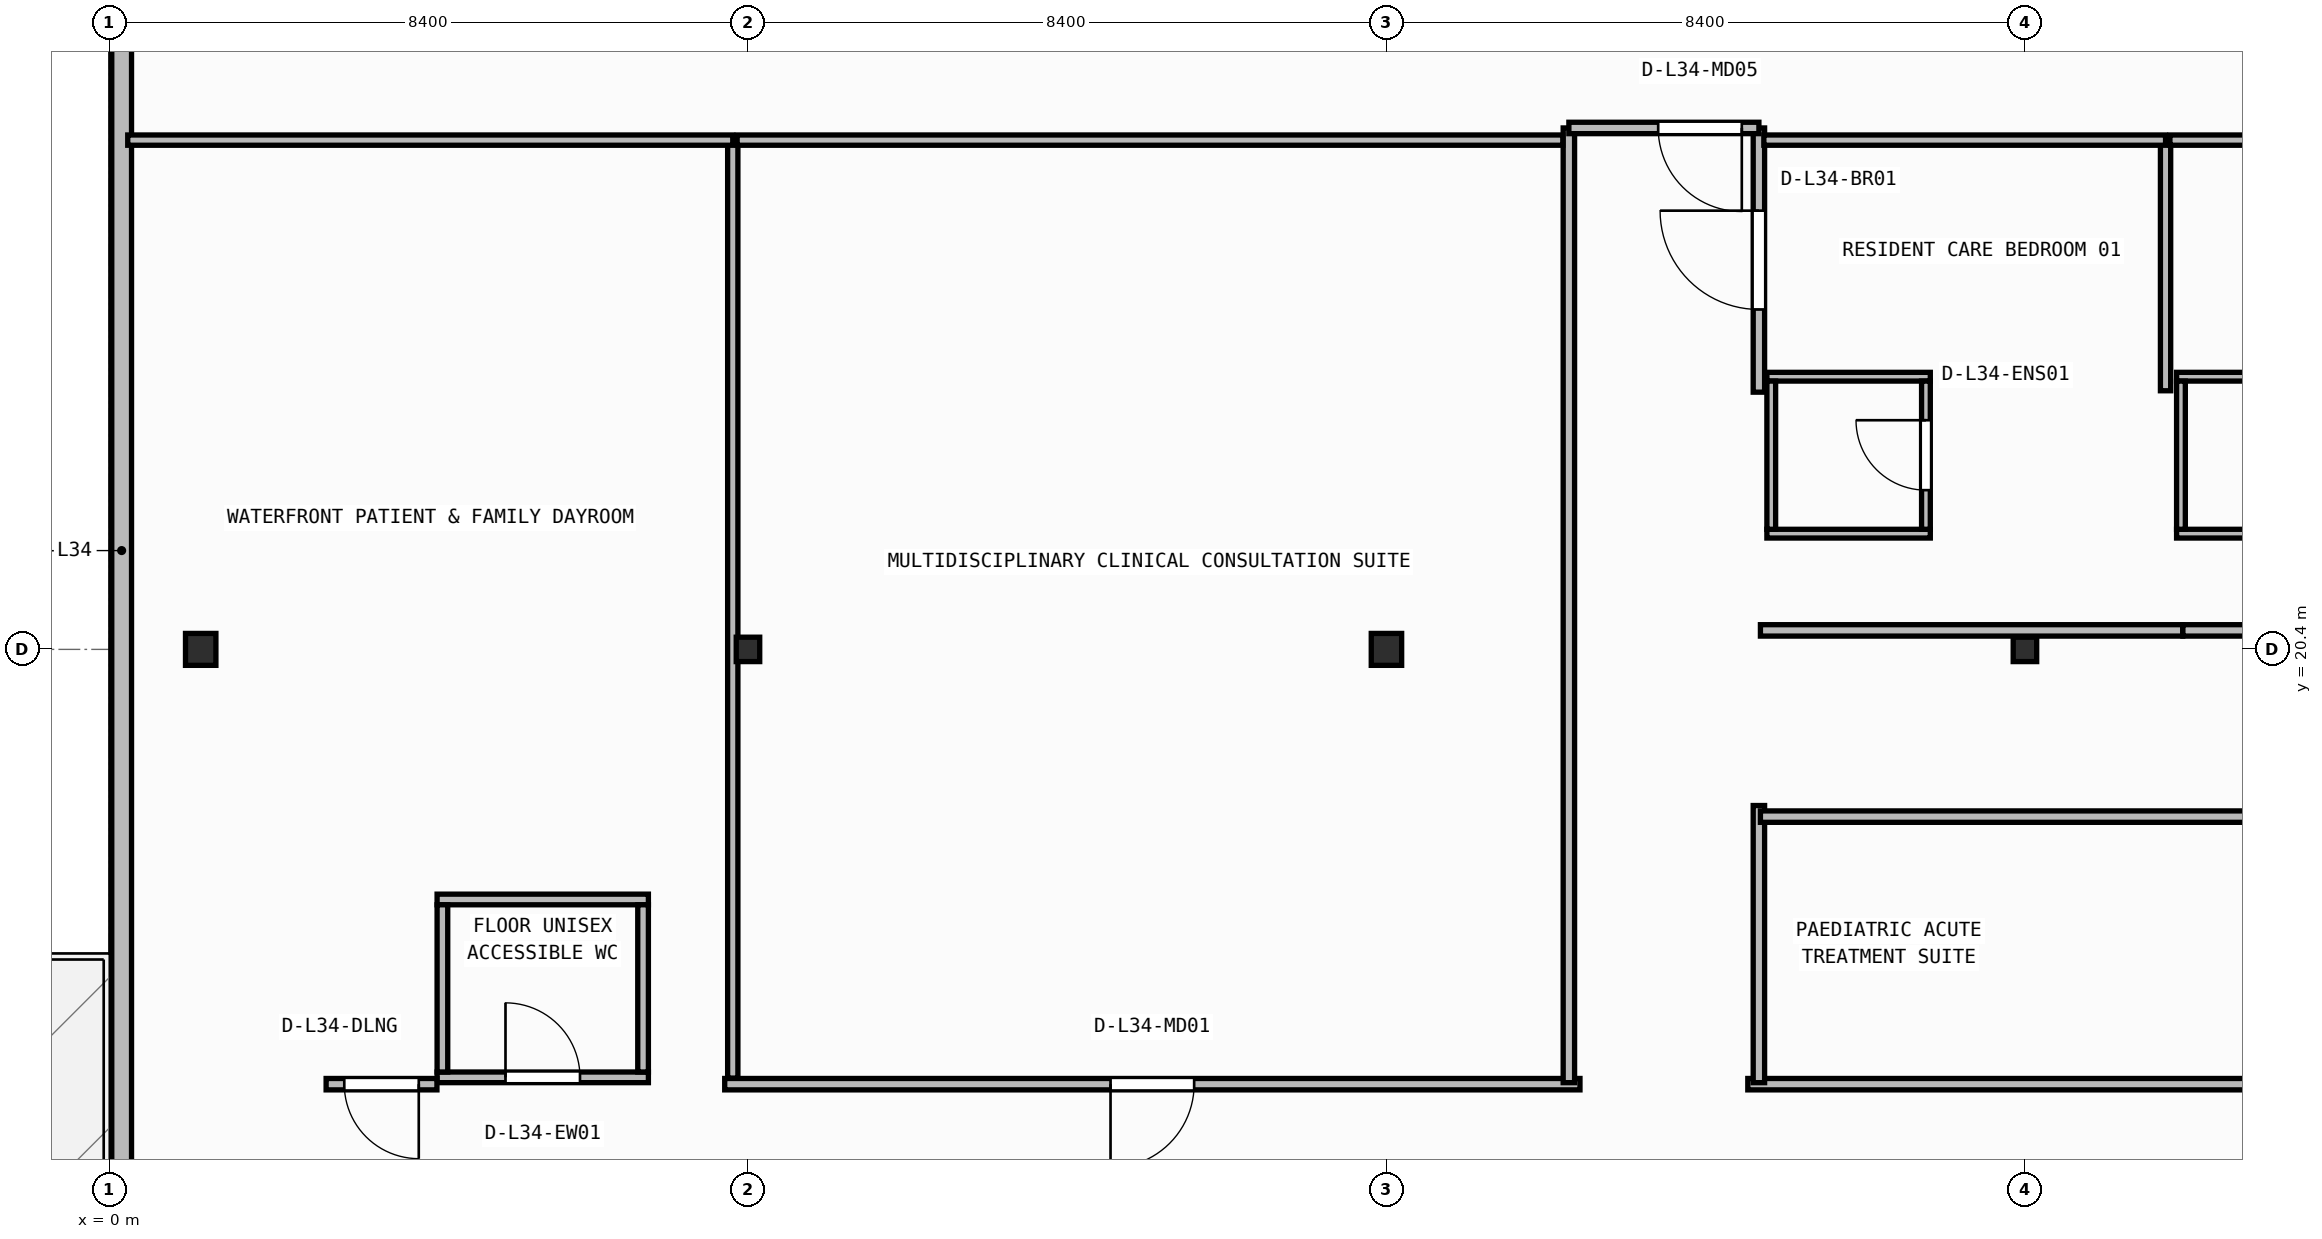
"""IFC4 building model, lengths in metres.
Left out: names, types, materials, properties, quantities, classifications, styles, units other than length and angle.
Written with IfcOpenShell. Run it as: python <this file> out.ifc"""

import sys

from ifc_helpers import new_model, si_unit, direction, frame, frame_2d, origin, origin_2d, place, context, subcontext, project, spatial, rectangle, i_section, extrude, element, fill, save


model = new_model("IFC4")
c1 = context("Model", 3, precision=1e-05, world=origin(), true_north=direction((0.0, 1.0)))
c2 = subcontext(c1, "Body", "Model", "MODEL_VIEW")
j1 = project(units=[si_unit("LENGTHUNIT", "METRE"), si_unit("PLANEANGLEUNIT", "RADIAN")], contexts=[c1])
p1 = place(None, origin())
s1 = spatial("IfcSite", under=j1, at=p1, CompositionType="ELEMENT")
p2 = place(p1, origin())
s2 = spatial("IfcBuilding", under=s1, at=p2, CompositionType="ELEMENT")
p3 = place(p2, frame((0.0, 0.0, 138.9)))
s3 = spatial("IfcBuildingStorey", under=s2, at=p3, CompositionType="ELEMENT", Elevation=138.9)
p4 = place(p3, frame((1.2, 20.4, 0.0), z_axis=(0.0, 0.0, 1.0), x_axis=(1.0, 0.0, 0.0)))
e1 = element("IfcColumn", 1, at=p4, inside=s3, PredefinedType="COLUMN", context=c2, shape_type="SweptSolid", body=[
    extrude(i_section(OverallWidth=0.4, OverallDepth=0.42, WebThickness=0.025, FlangeThickness=0.04, at=origin_2d()), origin(), (0.0, 0.0, 1.0), 3.95),
])
p5 = place(p3, frame((8.4, 20.4, 0.0), z_axis=(0.0, 0.0, 1.0), x_axis=(1.0, 0.0, 0.0)))
e2 = element("IfcColumn", 2, at=p5, inside=s3, PredefinedType="COLUMN", context=c2, shape_type="SweptSolid", body=[
    extrude(i_section(OverallWidth=0.309, OverallDepth=0.321, WebThickness=0.014, FlangeThickness=0.022, FilletRadius=0.017, at=origin_2d()), origin(), (0.0, 0.0, 1.0), 3.95),
])
p6 = place(p3, frame((16.8, 20.4, 0.0), z_axis=(0.0, 0.0, 1.0), x_axis=(1.0, 0.0, 0.0)))
e3 = element("IfcColumn", 3, at=p6, inside=s3, PredefinedType="COLUMN", context=c2, shape_type="SweptSolid", body=[
    extrude(i_section(OverallWidth=0.4, OverallDepth=0.42, WebThickness=0.025, FlangeThickness=0.04, at=origin_2d()), origin(), (0.0, 0.0, 1.0), 3.95),
])
p7 = place(p3, frame((25.2, 20.4, 0.0), z_axis=(0.0, 0.0, 1.0), x_axis=(1.0, 0.0, 0.0)))
e4 = element("IfcColumn", 4, at=p7, inside=s3, PredefinedType="COLUMN", context=c2, shape_type="SweptSolid", body=[
    extrude(i_section(OverallWidth=0.309, OverallDepth=0.321, WebThickness=0.014, FlangeThickness=0.022, FilletRadius=0.017, at=origin_2d()), origin(), (0.0, 0.0, 1.0), 3.95),
])
p8 = place(p3, frame((0.16, 40.64, 0.0), z_axis=(0.0, 0.0, 1.0), x_axis=(0.0, -1.0, 0.0)))
e5 = element("IfcWall", 5, at=p8, inside=s3, PredefinedType="STANDARD", context=c2, shape_type="SweptSolid", body=[
    extrude(rectangle(XDim=37.88, YDim=0.26, at=frame_2d((18.94, 0.0))), origin(), (0.0, 0.0, 1.0), 3.71),
])
p9 = place(p8, frame((29.865, 0.0, 0.0)))
e6 = element("IfcOpeningElement", 6, at=p9, cuts=e5, PredefinedType="OPENING", context=c2, shape_type="SweptSolid", body=[
    extrude(rectangle(XDim=1.3, YDim=2.15, at=frame_2d((0.65, 1.075))), frame((0.0, 0.14, 0.0), z_axis=(0.0, -1.0, 0.0), x_axis=(1.0, 0.0, 0.0)), (0.0, 0.0, 1.0), 0.28),
])
p10 = place(p3, frame((4.31, 14.77, 0.0), z_axis=(0.0, 0.0, 1.0), x_axis=(1.0, 0.0, 0.0)))
e7 = element("IfcWall", 7, at=p10, inside=s3, PredefinedType="PARTITIONING", context=c2, shape_type="SweptSolid", body=[
    extrude(rectangle(XDim=2.78, YDim=0.14, at=frame_2d((1.39, 0.0))), origin(), (0.0, 0.0, 1.0), 3.71),
])
p11 = place(p10, frame((0.9, 0.0, 0.0)))
e8 = element("IfcOpeningElement", 8, at=p11, cuts=e7, PredefinedType="OPENING", context=c2, shape_type="SweptSolid", body=[
    extrude(rectangle(XDim=0.98, YDim=2.1, at=frame_2d((0.49, 1.05))), frame((0.0, 0.08, 0.0), z_axis=(0.0, -1.0, 0.0), x_axis=(1.0, 0.0, 0.0)), (0.0, 0.0, 1.0), 0.16),
])
p12 = place(p3, frame((4.31, 17.11, 0.0), z_axis=(0.0, 0.0, 1.0), x_axis=(1.0, 0.0, 0.0)))
e9 = element("IfcWall", 9, at=p12, inside=s3, PredefinedType="PARTITIONING", context=c2, shape_type="SweptSolid", body=[
    extrude(rectangle(XDim=2.78, YDim=0.14, at=frame_2d((1.39, 0.0))), origin(), (0.0, 0.0, 1.0), 3.71),
])
for number, where, z_axis, x_axis in (
    (10, (4.38, 14.84, 0.0), (0.0, 0.0, 1.0), (0.0, 1.0, 0.0)),
    (11, (7.02, 14.84, 0.0), (0.0, 0.0, 1.0), (0.0, 1.0, 0.0)),
):
    element("IfcWall", number, at=place(p3, frame(where, z_axis=z_axis, x_axis=x_axis)), inside=s3, PredefinedType="PARTITIONING", context=c2, shape_type="SweptSolid", body=[
        extrude(rectangle(XDim=2.2, YDim=0.14, at=frame_2d((1.1, 0.0))), origin(), (0.0, 0.0, 1.0), 3.71),
    ])
for number, where, z_axis, x_axis in (
    (12, (21.805, 21.923, 0.0), (0.0, 0.0, 1.0), (1.0, 0.0, 0.0)),
    (13, (21.805, 23.988, 0.0), (0.0, 0.0, 1.0), (1.0, 0.0, 0.0)),
):
    element("IfcWall", number, at=place(p3, frame(where, z_axis=z_axis, x_axis=x_axis)), inside=s3, PredefinedType="PARTITIONING", context=c2, shape_type="SweptSolid", body=[
        extrude(rectangle(XDim=2.15, YDim=0.115, at=frame_2d((1.075, 0.0))), origin(), (0.0, 0.0, 1.0), 3.71),
    ])
p13 = place(p3, frame((21.863, 21.98, 0.0), z_axis=(0.0, 0.0, 1.0), x_axis=(0.0, 1.0, 0.0)))
e14 = element("IfcWall", 14, at=p13, inside=s3, PredefinedType="PARTITIONING", context=c2, shape_type="SweptSolid", body=[
    extrude(rectangle(XDim=1.95, YDim=0.115, at=frame_2d((0.975, 0.0))), origin(), (0.0, 0.0, 1.0), 3.71),
])
p14 = place(p3, frame((23.897, 21.98, 0.0), z_axis=(0.0, 0.0, 1.0), x_axis=(0.0, 1.0, 0.0)))
e15 = element("IfcWall", 15, at=p14, inside=s3, PredefinedType="PARTITIONING", context=c2, shape_type="SweptSolid", body=[
    extrude(rectangle(XDim=1.95, YDim=0.115, at=frame_2d((0.975, 0.0))), origin(), (0.0, 0.0, 1.0), 3.71),
])
p15 = place(p14, frame((0.515, 0.0, 0.0)))
e16 = element("IfcOpeningElement", 16, at=p15, cuts=e15, PredefinedType="OPENING", context=c2, shape_type="SweptSolid", body=[
    extrude(rectangle(XDim=0.92, YDim=2.1, at=frame_2d((0.46, 1.05))), frame((0.0, 0.067, 0.0), z_axis=(0.0, -1.0, 0.0), x_axis=(1.0, 0.0, 0.0)), (0.0, 0.0, 1.0), 0.135),
])
for number, where, z_axis, x_axis in (
    (17, (27.195, 21.923, 0.0), (0.0, 0.0, 1.0), (1.0, 0.0, 0.0)),
    (18, (27.195, 23.988, 0.0), (0.0, 0.0, 1.0), (1.0, 0.0, 0.0)),
):
    element("IfcWall", number, at=place(p3, frame(where, z_axis=z_axis, x_axis=x_axis)), inside=s3, PredefinedType="PARTITIONING", context=c2, shape_type="SweptSolid", body=[
        extrude(rectangle(XDim=2.15, YDim=0.115, at=frame_2d((1.075, 0.0))), origin(), (0.0, 0.0, 1.0), 3.71),
    ])
p16 = place(p3, frame((27.252, 21.98, 0.0), z_axis=(0.0, 0.0, 1.0), x_axis=(0.0, 1.0, 0.0)))
e19 = element("IfcWall", 19, at=p16, inside=s3, PredefinedType="PARTITIONING", context=c2, shape_type="SweptSolid", body=[
    extrude(rectangle(XDim=1.95, YDim=0.115, at=frame_2d((0.975, 0.0))), origin(), (0.0, 0.0, 1.0), 3.71),
])
p17 = place(p3, frame((4.308, 14.68, 0.0), z_axis=(0.0, 0.0, 1.0), x_axis=(-1.0, 0.0, 0.0)))
e20 = element("IfcWall", 20, at=p17, inside=s3, PredefinedType="PARTITIONING", context=c2, shape_type="SweptSolid", body=[
    extrude(rectangle(XDim=1.458, YDim=0.15, at=frame_2d((0.729, 0.0))), origin(), (0.0, 0.0, 1.0), 3.71),
])
p18 = place(p17, frame((0.239, 0.0, 0.0)))
e21 = element("IfcOpeningElement", 21, at=p18, cuts=e20, PredefinedType="OPENING", context=c2, shape_type="SweptSolid", body=[
    extrude(rectangle(XDim=0.98, YDim=2.1, at=frame_2d((0.49, 1.05))), frame((0.0, 0.085, 0.0), z_axis=(0.0, -1.0, 0.0), x_axis=(1.0, 0.0, 0.0)), (0.0, 0.0, 1.0), 0.17),
])
p19 = place(p3, frame((19.346, 14.68, 0.0), z_axis=(0.0, 0.0, 1.0), x_axis=(-1.0, 0.0, 0.0)))
e22 = element("IfcWall", 22, at=p19, inside=s3, PredefinedType="PARTITIONING", context=c2, shape_type="SweptSolid", body=[
    extrude(rectangle(XDim=11.252, YDim=0.15, at=frame_2d((5.626, 0.0))), origin(), (0.0, 0.0, 1.0), 3.71),
])
p20 = place(p19, frame((5.076, 0.0, 0.0)))
e23 = element("IfcOpeningElement", 23, at=p20, cuts=e22, PredefinedType="OPENING", context=c2, shape_type="SweptSolid", body=[
    extrude(rectangle(XDim=1.1, YDim=2.1, at=frame_2d((0.55, 1.05))), frame((0.0, 0.085, 0.0), z_axis=(0.0, -1.0, 0.0), x_axis=(1.0, 0.0, 0.0)), (0.0, 0.0, 1.0), 0.17),
])
p21 = place(p3, frame((56.64, 14.68, 0.0), z_axis=(0.0, 0.0, 1.0), x_axis=(-1.0, 0.0, 0.0)))
e24 = element("IfcWall", 24, at=p21, inside=s3, PredefinedType="PARTITIONING", context=c2, shape_type="SweptSolid", body=[
    extrude(rectangle(XDim=35.086, YDim=0.15, at=frame_2d((17.543, 0.0))), origin(), (0.0, 0.0, 1.0), 3.71),
])
p22 = place(p21, frame((16.993, 0.0, 0.0)))
e25 = element("IfcOpeningElement", 25, at=p22, cuts=e24, PredefinedType="OPENING", context=c2, shape_type="SweptSolid", body=[
    extrude(rectangle(XDim=1.1, YDim=2.1, at=frame_2d((0.55, 1.05))), frame((0.0, 0.085, 0.0), z_axis=(0.0, -1.0, 0.0), x_axis=(1.0, 0.0, 0.0)), (0.0, 0.0, 1.0), 0.17),
])
p23 = place(p3, frame((19.2, 27.26, 0.0), z_axis=(0.0, 0.0, 1.0), x_axis=(0.0, -1.0, 0.0)))
e26 = element("IfcWall", 26, at=p23, inside=s3, PredefinedType="PARTITIONING", context=c2, shape_type="SweptSolid", body=[
    extrude(rectangle(XDim=12.56, YDim=0.15, at=frame_2d((6.28, 0.0))), origin(), (0.0, 0.0, 1.0), 3.71),
])
p24 = place(p3, frame((21.7, 14.7, 0.0), z_axis=(0.0, 0.0, 1.0), x_axis=(0.0, 1.0, 0.0)))
e27 = element("IfcWall", 27, at=p24, inside=s3, PredefinedType="PARTITIONING", context=c2, shape_type="SweptSolid", body=[
    extrude(rectangle(XDim=3.646, YDim=0.15, at=frame_2d((1.823, 0.0))), origin(), (0.0, 0.0, 1.0), 3.71),
])
p25 = place(p3, frame((21.7, 23.784, 0.0), z_axis=(0.0, 0.0, 1.0), x_axis=(0.0, 1.0, 0.0)))
e28 = element("IfcWall", 28, at=p25, inside=s3, PredefinedType="PARTITIONING", context=c2, shape_type="SweptSolid", body=[
    extrude(rectangle(XDim=3.476, YDim=0.15, at=frame_2d((1.738, 0.0))), origin(), (0.0, 0.0, 1.0), 3.71),
])
p26 = place(p25, frame((1.088, 0.0, 0.0)))
e29 = element("IfcOpeningElement", 29, at=p26, cuts=e28, PredefinedType="OPENING", context=c2, shape_type="SweptSolid", body=[
    extrude(rectangle(XDim=1.3, YDim=2.15, at=frame_2d((0.65, 1.075))), frame((0.0, 0.085, 0.0), z_axis=(0.0, -1.0, 0.0), x_axis=(1.0, 0.0, 0.0)), (0.0, 0.0, 1.0), 0.17),
])
p27 = place(p3, frame((21.7, 27.26, 0.0), z_axis=(0.0, 0.0, 1.0), x_axis=(-1.0, 0.0, 0.0)))
e30 = element("IfcWall", 30, at=p27, inside=s3, PredefinedType="PARTITIONING", context=c2, shape_type="SweptSolid", body=[
    extrude(rectangle(XDim=2.5, YDim=0.15, at=frame_2d((1.25, 0.0))), origin(), (0.0, 0.0, 1.0), 3.71),
])
p28 = place(p27, frame((0.225, 0.0, 0.0)))
e31 = element("IfcOpeningElement", 31, at=p28, cuts=e30, PredefinedType="OPENING", context=c2, shape_type="SweptSolid", body=[
    extrude(rectangle(XDim=1.1, YDim=2.1, at=frame_2d((0.55, 1.05))), frame((0.0, 0.085, 0.0), z_axis=(0.0, -1.0, 0.0), x_axis=(1.0, 0.0, 0.0)), (0.0, 0.0, 1.0), 0.17),
])
p29 = place(p3, frame((21.72, 18.2, 0.0), z_axis=(0.0, 0.0, 1.0), x_axis=(1.0, 0.0, 0.0)))
e32 = element("IfcWall", 32, at=p29, inside=s3, PredefinedType="PARTITIONING", context=c2, shape_type="SweptSolid", body=[
    extrude(rectangle(XDim=34.92, YDim=0.15, at=frame_2d((17.46, 0.0))), origin(), (0.0, 0.0, 1.0), 3.71),
])
p30 = place(p3, frame((27.276, 20.65, 0.0), z_axis=(0.0, 0.0, 1.0), x_axis=(-1.0, 0.0, 0.0)))
e33 = element("IfcWall", 33, at=p30, inside=s3, PredefinedType="PARTITIONING", context=c2, shape_type="SweptSolid", body=[
    extrude(rectangle(XDim=5.556, YDim=0.15, at=frame_2d((2.778, 0.0))), origin(), (0.0, 0.0, 1.0), 3.083),
])
p31 = place(p3, frame((33.076, 20.65, 0.0), z_axis=(0.0, 0.0, 1.0), x_axis=(-1.0, 0.0, 0.0)))
e34 = element("IfcWall", 34, at=p31, inside=s3, PredefinedType="PARTITIONING", context=c2, shape_type="SweptSolid", body=[
    extrude(rectangle(XDim=5.798, YDim=0.15, at=frame_2d((2.899, 0.0))), origin(), (0.0, 0.0, 1.0), 3.083),
])
p32 = place(p31, frame((3.069, 0.0, 0.0)))
e35 = element("IfcOpeningElement", 35, at=p32, cuts=e34, PredefinedType="OPENING", context=c2, shape_type="SweptSolid", body=[
    extrude(rectangle(XDim=1.3, YDim=2.15, at=frame_2d((0.65, 1.075))), frame((0.0, 0.085, 0.0), z_axis=(0.0, -1.0, 0.0), x_axis=(1.0, 0.0, 0.0)), (0.0, 0.0, 1.0), 0.17),
])
p33 = place(p3, frame((8.2, 14.76, 0.0), z_axis=(0.0, 0.0, 1.0), x_axis=(0.0, 1.0, 0.0)))
e36 = element("IfcWall", 36, at=p33, inside=s3, PredefinedType="PARTITIONING", context=c2, shape_type="SweptSolid", body=[
    extrude(rectangle(XDim=12.34, YDim=0.135, at=frame_2d((6.17, 0.0))), origin(), (0.0, 0.0, 1.0), 3.152),
])
p34 = place(p3, frame((8.2, 27.1, 0.0), z_axis=(0.0, 0.0, 1.0), x_axis=(-1.0, 0.0, 0.0)))
e37 = element("IfcWall", 37, at=p34, inside=s3, PredefinedType="PARTITIONING", context=c2, shape_type="SweptSolid", body=[
    extrude(rectangle(XDim=7.96, YDim=0.135, at=frame_2d((3.98, 0.0))), origin(), (0.0, 0.0, 1.0), 3.71),
])
p35 = place(p3, frame((19.12, 27.1, 0.0), z_axis=(0.0, 0.0, 1.0), x_axis=(-1.0, 0.0, 0.0)))
e38 = element("IfcWall", 38, at=p35, inside=s3, PredefinedType="PARTITIONING", context=c2, shape_type="SweptSolid", body=[
    extrude(rectangle(XDim=10.863, YDim=0.135, at=frame_2d((5.431, 0.0))), origin(), (0.0, 0.0, 1.0), 3.71),
])
p36 = place(p3, frame((27.05, 23.802, 0.0), z_axis=(0.0, 0.0, 1.0), x_axis=(0.0, 1.0, 0.0)))
e39 = element("IfcWall", 39, at=p36, inside=s3, PredefinedType="PARTITIONING", context=c2, shape_type="SweptSolid", body=[
    extrude(rectangle(XDim=3.298, YDim=0.135, at=frame_2d((1.649, 0.0))), origin(), (0.0, 0.0, 1.0), 3.71),
])
p37 = place(p3, frame((27.05, 27.1, 0.0), z_axis=(0.0, 0.0, 1.0), x_axis=(-1.0, 0.0, 0.0)))
e40 = element("IfcWall", 40, at=p37, inside=s3, PredefinedType="PARTITIONING", context=c2, shape_type="SweptSolid", body=[
    extrude(rectangle(XDim=5.285, YDim=0.135, at=frame_2d((2.643, 0.0))), origin(), (0.0, 0.0, 1.0), 3.71),
])
p38 = place(p3, frame((32.792, 27.1, 0.0), z_axis=(0.0, 0.0, 1.0), x_axis=(-1.0, 0.0, 0.0)))
e41 = element("IfcWall", 41, at=p38, inside=s3, PredefinedType="PARTITIONING", context=c2, shape_type="SweptSolid", body=[
    extrude(rectangle(XDim=5.685, YDim=0.135, at=frame_2d((2.843, 0.0))), origin(), (0.0, 0.0, 1.0), 3.71),
])
p39 = place(p11, origin())
e42 = element("IfcDoor", 42, at=p39, inside=s3, OperationType="SINGLE_SWING_LEFT", PredefinedType="DOOR", context=c2, shape_type="SweptSolid", body=[
    extrude(rectangle(XDim=0.98, YDim=2.1, at=frame_2d((0.49, 1.05))), frame((0.0, 0.025, 0.0), z_axis=(0.0, -1.0, 0.0), x_axis=(1.0, 0.0, 0.0)), (0.0, 0.0, 1.0), 0.05),
])
fill(e8, e42)
p40 = place(p15, origin())
e43 = element("IfcDoor", 43, at=p40, inside=s3, OperationType="SINGLE_SWING_RIGHT", PredefinedType="DOOR", context=c2, shape_type="SweptSolid", body=[
    extrude(rectangle(XDim=0.92, YDim=2.1, at=frame_2d((0.46, 1.05))), frame((0.0, 0.025, 0.0), z_axis=(0.0, -1.0, 0.0), x_axis=(1.0, 0.0, 0.0)), (0.0, 0.0, 1.0), 0.05),
])
fill(e16, e43)
p41 = place(p18, origin())
e44 = element("IfcDoor", 44, at=p41, inside=s3, OperationType="SINGLE_SWING_LEFT", PredefinedType="DOOR", context=c2, shape_type="SweptSolid", body=[
    extrude(rectangle(XDim=0.98, YDim=2.1, at=frame_2d((0.49, 1.05))), frame((0.0, 0.025, 0.0), z_axis=(0.0, -1.0, 0.0), x_axis=(1.0, 0.0, 0.0)), (0.0, 0.0, 1.0), 0.05),
])
fill(e21, e44)
p42 = place(p20, origin())
e45 = element("IfcDoor", 45, at=p42, inside=s3, OperationType="SINGLE_SWING_RIGHT", PredefinedType="DOOR", context=c2, shape_type="SweptSolid", body=[
    extrude(rectangle(XDim=1.1, YDim=2.1, at=frame_2d((0.55, 1.05))), frame((0.0, 0.025, 0.0), z_axis=(0.0, -1.0, 0.0), x_axis=(1.0, 0.0, 0.0)), (0.0, 0.0, 1.0), 0.05),
])
fill(e23, e45)
p43 = place(p26, origin())
e46 = element("IfcDoor", 46, at=p43, inside=s3, OperationType="SINGLE_SWING_RIGHT", PredefinedType="DOOR", context=c2, shape_type="SweptSolid", body=[
    extrude(rectangle(XDim=1.3, YDim=2.15, at=frame_2d((0.65, 1.075))), frame((0.0, 0.025, 0.0), z_axis=(0.0, -1.0, 0.0), x_axis=(1.0, 0.0, 0.0)), (0.0, 0.0, 1.0), 0.05),
])
fill(e29, e46)
p44 = place(p28, origin())
e47 = element("IfcDoor", 47, at=p44, inside=s3, OperationType="SINGLE_SWING_LEFT", PredefinedType="DOOR", context=c2, shape_type="SweptSolid", body=[
    extrude(rectangle(XDim=1.1, YDim=2.1, at=frame_2d((0.55, 1.05))), frame((0.0, 0.025, 0.0), z_axis=(0.0, -1.0, 0.0), x_axis=(1.0, 0.0, 0.0)), (0.0, 0.0, 1.0), 0.05),
])
fill(e31, e47)
save(model, sys.argv[1])
